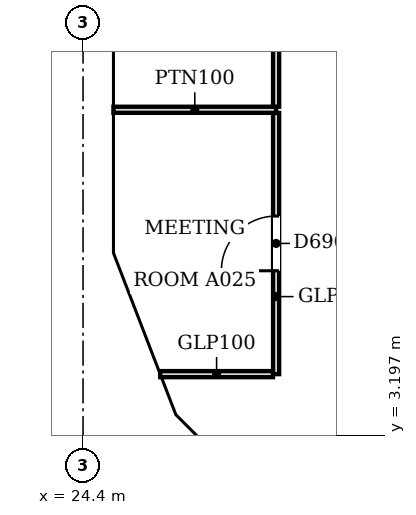
"""IFC4 building model, lengths in metres.
Left out: names, types, materials, properties, quantities, classifications, styles, units other than length and angle.
Written with IfcOpenShell. Run it as: python <this file> out.ifc"""

import sys

from ifc_helpers import new_model, si_unit, direction, frame, frame_2d, origin, place, context, subcontext, project, spatial, polyline, rectangle, outline, extrude, faceted_brep, source, transform, mapped, element, fill, save


model = new_model("IFC4")
c1 = context("Model", 3, precision=1e-05, world=origin(), true_north=direction((0.0, 1.0)))
c2 = subcontext(c1, "Body", "Model", "MODEL_VIEW")
j1 = project(units=[si_unit("LENGTHUNIT", "METRE"), si_unit("PLANEANGLEUNIT", "RADIAN")], contexts=[c1])
p1 = place(None, origin())
s1 = spatial("IfcSite", under=j1, at=p1, CompositionType="ELEMENT")
p2 = place(p1, origin())
s2 = spatial("IfcBuilding", under=s1, at=p2, CompositionType="ELEMENT")
p3 = place(p2, frame((0.0, 0.0, 216.9)))
s3 = spatial("IfcBuildingStorey", under=s2, at=p3, CompositionType="ELEMENT", Elevation=216.9)
m1 = source(origin(), c2, "Body", "Brep", [
    faceted_brep([(0.093, -0.25, 0.057), (3.143, -0.25, 3.8), (0.093, -0.25, 7.543), (0.0, 0.25, 7.544), (0.047, 0.25, 7.6), (3.143, 0.25, 3.8), (0.047, 0.25, 0.0), (0.0, 0.25, 0.056), (0.047, 0.0, 0.0), (0.047, 0.0, 7.6)], [[[0, 1, 2]], [[3, 4, 5, 6, 7]], [[6, 5, 1, 0, 8]], [[5, 4, 9, 2, 1]], [[4, 3, 9]], [[7, 6, 8]], [[7, 8, 0, 2, 9, 3]]]),
])
p4 = place(p3, frame((24.65, 12.293, -3.8), z_axis=(0.0, 0.0, 1.0), x_axis=(0.0, -1.0, 0.0)))
e1 = element("IfcWall", 1, at=p4, inside=s3, PredefinedType="SOLIDWALL", context=c2, shape_type="MappedRepresentation", body=[
    mapped(m1, transform((0.0, 0.0, 0.0), scale=1.0)),
])
m2 = source(origin(), c2, "Body", "SweptSolid", [
    extrude(outline(polyline([(0.247, 0.641), (2.821, 3.8), (0.247, 6.959), (0.247, 0.641)])), frame((0.0, 0.26, 0.0), z_axis=(0.0, -1.0, 0.0), x_axis=(1.0, 0.0, 0.0)), (0.0, 0.0, 1.0), 0.52),
])
p5 = place(p4, origin())
e2 = element("IfcOpeningElement", 2, at=p5, cuts=e1, PredefinedType="OPENING", context=c2, shape_type="MappedRepresentation", body=[
    mapped(m2, transform((0.0, 0.0, 0.0), scale=1.0)),
])
m3 = source(origin(), c2, "Body", "Brep", [
    faceted_brep([(3.003, -0.25, 0.0), (3.05, -0.25, 0.06), (3.05, -0.25, 7.54), (3.003, -0.25, 7.6), (0.0, -0.25, 3.8), (0.0, 0.25, 3.8), (2.957, 0.25, 7.541), (2.957, 0.25, 0.059), (3.003, 0.0, 0.0), (3.003, 0.0, 7.6)], [[[0, 1, 2, 3, 4]], [[5, 6, 7]], [[1, 0, 8]], [[9, 3, 2]], [[6, 5, 4, 3, 9]], [[5, 7, 8, 0, 4]], [[1, 8, 7, 6, 9, 2]]]),
])
p6 = place(p3, frame((24.65, 9.15, -3.8), z_axis=(0.0, 0.0, 1.0), x_axis=(0.0, -1.0, 0.0)))
e3 = element("IfcWall", 3, at=p6, inside=s3, PredefinedType="SOLIDWALL", context=c2, shape_type="MappedRepresentation", body=[
    mapped(m3, transform((0.0, 0.0, 0.0), scale=1.0)),
])
m4 = source(origin(), c2, "Body", "SweptSolid", [
    extrude(outline(polyline([(2.803, 6.944), (0.319, 3.8), (2.803, 0.656), (2.803, 6.944)])), frame((0.0, 0.26, 0.0), z_axis=(0.0, -1.0, 0.0), x_axis=(1.0, 0.0, 0.0)), (0.0, 0.0, 1.0), 0.52),
])
p7 = place(p6, origin())
e4 = element("IfcOpeningElement", 4, at=p7, cuts=e3, PredefinedType="OPENING", context=c2, shape_type="MappedRepresentation", body=[
    mapped(m4, transform((0.0, 0.0, 0.0), scale=1.0)),
])
m5 = source(origin(), c2, "Body", "Brep", [
    faceted_brep([(0.047, -0.25, 0.0), (2.997, -0.25, 3.8), (0.047, -0.25, 7.6), (0.0, -0.25, 7.541), (0.0, -0.25, 0.059), (0.093, 0.25, 7.54), (2.944, 0.25, 3.868), (2.944, 0.25, 3.732), (0.093, 0.25, 0.06), (2.997, 0.0, 3.8), (0.047, 0.0, 0.0), (0.047, 0.0, 7.6)], [[[0, 1, 2, 3, 4]], [[5, 6, 7, 8]], [[8, 7, 9, 1, 0, 10]], [[6, 5, 11, 2, 1, 9]], [[3, 2, 11]], [[10, 0, 4]], [[8, 10, 4, 3, 11, 5]], [[9, 7, 6]]]),
])
p8 = place(p3, frame((24.633, 6.19, -3.8), z_axis=(0.0, 0.0, 1.0), x_axis=(0.359901446078, -0.932990326376, 0.0)))
e5 = element("IfcWall", 5, at=p8, inside=s3, PredefinedType="SOLIDWALL", context=c2, shape_type="MappedRepresentation", body=[
    mapped(m5, transform((0.0, 0.0, 0.0), scale=1.0)),
])
m6 = source(origin(), c2, "Body", "SweptSolid", [
    extrude(outline(polyline([(0.247, 0.665), (2.681, 3.8), (0.247, 6.935), (0.247, 0.665)])), frame((0.0, 0.26, 0.0), z_axis=(0.0, -1.0, 0.0), x_axis=(1.0, 0.0, 0.0)), (0.0, 0.0, 1.0), 0.52),
])
p9 = place(p8, origin())
e6 = element("IfcOpeningElement", 6, at=p9, cuts=e5, PredefinedType="OPENING", context=c2, shape_type="MappedRepresentation", body=[
    mapped(m6, transform((0.0, 0.0, 0.0), scale=1.0)),
])
m7 = source(origin(), c2, "Body", "Brep", [
    faceted_brep([(2.944, -0.25, 0.0), (2.997, -0.25, 0.068), (2.997, -0.25, 7.532), (2.944, -0.25, 7.6), (0.0, -0.25, 3.8), (0.053, 0.25, 3.868), (2.891, 0.25, 7.532), (2.891, 0.25, 0.068), (0.053, 0.25, 3.731), (2.944, 0.0, 0.0), (2.944, 0.0, 7.6), (0.0, 0.0, 3.8)], [[[0, 1, 2, 3, 4]], [[5, 6, 7, 8]], [[1, 0, 9]], [[10, 3, 2]], [[6, 5, 11, 4, 3, 10]], [[8, 7, 9, 0, 4, 11]], [[8, 11, 5]], [[1, 9, 7, 6, 10, 2]]]),
])
p10 = place(p3, frame((25.712, 3.394, -3.8), z_axis=(0.0, 0.0, 1.0), x_axis=(0.707066050402, -0.707147509625, 0.0)))
e7 = element("IfcWall", 7, at=p10, inside=s3, PredefinedType="SOLIDWALL", context=c2, shape_type="MappedRepresentation", body=[
    mapped(m7, transform((0.0, 0.0, 0.0), scale=1.0)),
])
m8 = source(origin(), c2, "Body", "SweptSolid", [
    extrude(outline(polyline([(2.744, 6.934), (0.316, 3.8), (2.744, 0.666), (2.744, 6.934)])), frame((0.0, 0.26, 0.0), z_axis=(0.0, -1.0, 0.0), x_axis=(1.0, 0.0, 0.0)), (0.0, 0.0, 1.0), 0.52),
])
p11 = place(p10, origin())
e8 = element("IfcOpeningElement", 8, at=p11, cuts=e7, PredefinedType="OPENING", context=c2, shape_type="MappedRepresentation", body=[
    mapped(m8, transform((0.0, 0.0, 0.0), scale=1.0)),
])
p12 = place(p2, frame((0.0, 0.0, 220.7)))
s4 = spatial("IfcBuildingStorey", under=s2, at=p12, CompositionType="ELEMENT", Elevation=220.7)
m9 = source(origin(), c2, "Body", "Brep", [
    faceted_brep([(3.096, -0.25, 0.0), (6.1, -0.25, 3.8), (3.096, -0.25, 7.6), (0.047, -0.25, 3.857), (0.047, -0.25, 3.743), (0.0, 0.25, 3.8), (3.096, 0.25, 7.6), (6.053, 0.25, 3.859), (6.053, 0.25, 3.741), (3.096, 0.25, 0.0), (6.1, -0.0, 3.8), (0.0, 0.0, 3.8)], [[[0, 1, 2, 3, 4]], [[5, 6, 7, 8, 9]], [[9, 8, 10, 1, 0]], [[7, 6, 2, 1, 10]], [[6, 5, 11, 3, 2]], [[5, 9, 0, 4, 11]], [[11, 4, 3]], [[10, 8, 7]]]),
])
p13 = place(p12, frame((24.65, 12.247, -3.8), z_axis=(0.0, 0.0, 1.0), x_axis=(0.0, -1.0, 0.0)))
e9 = element("IfcWall", 9, at=p13, inside=s4, PredefinedType="SOLIDWALL", context=c2, shape_type="MappedRepresentation", body=[
    mapped(m9, transform((0.0, 0.0, 0.0), scale=1.0)),
])
m10 = source(origin(), c2, "Body", "SweptSolid", [
    extrude(outline(polyline([(3.094, 0.399), (5.781, 3.8), (3.094, 7.201), (0.323, 3.8), (3.094, 0.399)])), frame((0.0, 0.26, 0.0), z_axis=(0.0, -1.0, 0.0), x_axis=(1.0, 0.0, 0.0)), (0.0, 0.0, 1.0), 0.52),
])
p14 = place(p13, origin())
e10 = element("IfcOpeningElement", 10, at=p14, cuts=e9, PredefinedType="OPENING", context=c2, shape_type="MappedRepresentation", body=[
    mapped(m10, transform((0.0, 0.0, 0.0), scale=1.0)),
])
m11 = source(origin(), c2, "Body", "Brep", [
    faceted_brep([(2.95, -0.25, 0.0), (3.003, -0.25, 0.068), (3.003, -0.25, 7.532), (2.95, -0.25, 7.6), (0.0, -0.25, 3.8), (0.047, 0.25, 3.86), (2.898, 0.25, 7.532), (2.898, 0.25, 0.068), (0.047, 0.25, 3.74), (2.95, 0.0, 0.0), (2.95, 0.0, 7.6), (0.0, 0.0, 3.8)], [[[0, 1, 2, 3, 4]], [[5, 6, 7, 8]], [[1, 0, 9]], [[10, 3, 2]], [[6, 5, 11, 4, 3, 10]], [[8, 7, 9, 0, 4, 11]], [[8, 11, 5]], [[1, 9, 7, 6, 10, 2]]]),
])
p15 = place(p12, frame((24.65, 6.146, -3.8), z_axis=(0.0, 0.0, 1.0), x_axis=(0.359953949349, -0.932970071518, 0.0)))
e11 = element("IfcWall", 11, at=p15, inside=s4, PredefinedType="SOLIDWALL", context=c2, shape_type="MappedRepresentation", body=[
    mapped(m11, transform((0.0, 0.0, 0.0), scale=1.0)),
])
m12 = source(origin(), c2, "Body", "SweptSolid", [
    extrude(outline(polyline([(2.75, 6.935), (0.316, 3.8), (2.75, 0.665), (2.75, 6.935)])), frame((0.0, 0.26, 0.0), z_axis=(0.0, -1.0, 0.0), x_axis=(1.0, 0.0, 0.0)), (0.0, 0.0, 1.0), 0.52),
])
p16 = place(p15, origin())
e12 = element("IfcOpeningElement", 12, at=p16, cuts=e11, PredefinedType="OPENING", context=c2, shape_type="MappedRepresentation", body=[
    mapped(m12, transform((0.0, 0.0, 0.0), scale=1.0)),
])
m13 = source(origin(), c2, "Body", "Brep", [
    faceted_brep([(0.053, -0.25, 0.0), (2.997, -0.25, 3.8), (0.053, -0.25, 7.6), (0.0, -0.25, 7.532), (0.0, -0.25, 0.068), (0.106, 0.25, 7.532), (2.944, 0.25, 3.868), (2.944, 0.25, 3.732), (0.106, 0.25, 0.068), (2.997, 0.0, 3.8), (0.053, 0.0, 0.0), (0.053, 0.0, 7.6)], [[[0, 1, 2, 3, 4]], [[5, 6, 7, 8]], [[8, 7, 9, 1, 0, 10]], [[6, 5, 11, 2, 1, 9]], [[3, 2, 11]], [[10, 0, 4]], [[8, 10, 4, 3, 11, 5]], [[9, 7, 6]]]),
])
p17 = place(p12, frame((25.675, 3.431, -3.8), z_axis=(0.0, 0.0, 1.0), x_axis=(0.707106781187, -0.707106781187, 0.0)))
e13 = element("IfcWall", 13, at=p17, inside=s4, PredefinedType="SOLIDWALL", context=c2, shape_type="MappedRepresentation", body=[
    mapped(m13, transform((0.0, 0.0, 0.0), scale=1.0)),
])
m14 = source(origin(), c2, "Body", "SweptSolid", [
    extrude(outline(polyline([(0.253, 0.667), (2.681, 3.8), (0.253, 6.934), (0.253, 0.667)])), frame((0.0, 0.26, 0.0), z_axis=(0.0, -1.0, 0.0), x_axis=(1.0, 0.0, 0.0)), (0.0, 0.0, 1.0), 0.52),
])
p18 = place(p17, origin())
e14 = element("IfcOpeningElement", 14, at=p18, cuts=e13, PredefinedType="OPENING", context=c2, shape_type="MappedRepresentation", body=[
    mapped(m14, transform((0.0, 0.0, 0.0), scale=1.0)),
])
p19 = place(p3, frame((25.669, 4.2, 0.0), z_axis=(0.0, 0.0, 1.0), x_axis=(1.0, 0.0, 0.0)))
e15 = element("IfcWall", 15, at=p19, inside=s3, PredefinedType="PARTITIONING", context=c2, shape_type="SweptSolid", body=[
    extrude(rectangle(XDim=1.855, YDim=0.1, at=frame_2d((0.928, 0.0))), origin(), (0.0, 0.0, 1.0), 3.067),
])
p20 = place(p3, frame((27.575, 4.2, 0.0), z_axis=(0.0, 0.0, 1.0), x_axis=(0.0, 1.0, 0.0)))
e16 = element("IfcWall", 16, at=p20, inside=s3, PredefinedType="PARTITIONING", context=c2, shape_type="SweptSolid", body=[
    extrude(rectangle(XDim=4.297, YDim=0.1, at=frame_2d((2.148, 0.0))), origin(), (0.0, 0.0, 1.0), 3.067),
])
m15 = source(origin(), c2, "Body", "SweptSolid", [
    extrude(rectangle(XDim=0.9, YDim=2.1, at=frame_2d((0.45, 1.05))), frame((0.0, 0.06, 0.0), z_axis=(0.0, -1.0, 0.0), x_axis=(1.0, 0.0, 0.0)), (0.0, 0.0, 1.0), 0.12),
])
p21 = place(p20, frame((1.7, 0.0, 0.0)))
e17 = element("IfcOpeningElement", 17, at=p21, cuts=e16, PredefinedType="OPENING", context=c2, shape_type="MappedRepresentation", body=[
    mapped(m15, transform((0.0, 0.0, 0.0), scale=1.0)),
])
p22 = place(p3, frame((24.9, 8.548, 0.0), z_axis=(0.0, 0.0, 1.0), x_axis=(1.0, 0.0, 0.0)))
e18 = element("IfcWall", 18, at=p22, inside=s3, PredefinedType="PARTITIONING", context=c2, shape_type="SweptSolid", body=[
    extrude(rectangle(XDim=2.675, YDim=0.1, at=frame_2d((1.337, 0.0))), origin(), (0.0, 0.0, 1.0), 3.067),
])
p23 = place(p3, frame((27.575, 8.599, 0.0), z_axis=(0.0, 0.0, 1.0), x_axis=(0.0, 1.0, 0.0)))
e19 = element("IfcWall", 19, at=p23, inside=s3, PredefinedType="PARTITIONING", context=c2, shape_type="SweptSolid", body=[
    extrude(rectangle(XDim=4.525, YDim=0.1, at=frame_2d((2.263, 0.0))), origin(), (0.0, 0.0, 1.0), 3.067),
])
p24 = place(p23, frame((1.8, 0.0, 0.0)))
e20 = element("IfcOpeningElement", 20, at=p24, cuts=e19, PredefinedType="OPENING", context=c2, shape_type="MappedRepresentation", body=[
    mapped(m15, transform((0.0, 0.0, 0.0), scale=1.0)),
])
m16 = source(origin(), c2, "Body", "SweptSolid", [
    extrude(rectangle(XDim=0.9, YDim=2.1, at=frame_2d((0.45, 1.05))), frame((0.0, 0.025, 0.0), z_axis=(0.0, -1.0, 0.0), x_axis=(1.0, 0.0, 0.0)), (0.0, 0.0, 1.0), 0.05),
])
p25 = place(p21, origin())
e21 = element("IfcDoor", 21, at=p25, inside=s3, OperationType="SINGLE_SWING_LEFT", PredefinedType="DOOR", context=c2, shape_type="MappedRepresentation", body=[
    mapped(m16, transform((0.0, 0.0, 0.0), scale=1.0)),
])
fill(e17, e21)
save(model, sys.argv[1])
